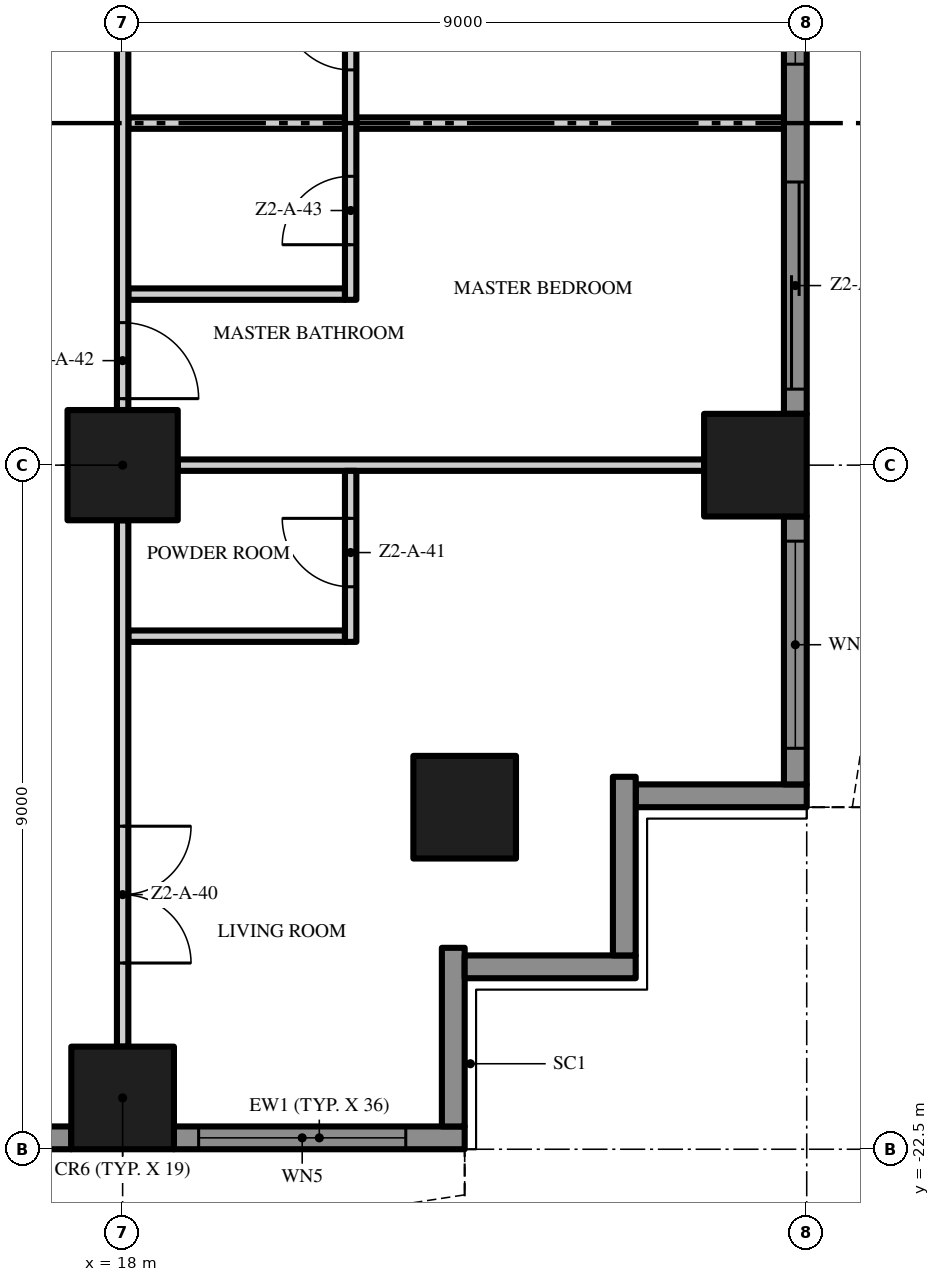
"""IFC4 building model, lengths in metres.
Left out: names, types, materials, properties, quantities, classifications, styles, units other than length and angle.
Written with IfcOpenShell. Run it as: python <this file> out.ifc"""

import sys

from ifc_helpers import new_model, si_unit, direction, frame, frame_2d, origin, origin_2d, place, context, subcontext, project, spatial, polyline, rectangle, outline, extrude, element, fill, save


model = new_model("IFC4")
c1 = context("Model", 3, precision=1e-05, world=origin(), true_north=direction((0.0, 1.0)))
c2 = subcontext(c1, "Body", "Model", "MODEL_VIEW")
j1 = project(units=[si_unit("LENGTHUNIT", "METRE"), si_unit("PLANEANGLEUNIT", "RADIAN")], contexts=[c1])
p1 = place(None, origin())
s1 = spatial("IfcSite", under=j1, at=p1, CompositionType="ELEMENT")
p2 = place(p1, origin())
s2 = spatial("IfcBuilding", under=s1, at=p2, CompositionType="ELEMENT")
p3 = place(p2, frame((0.0, 0.0, 69.4)))
s3 = spatial("IfcBuildingStorey", under=s2, at=p3, CompositionType="ELEMENT", Elevation=69.4)
p4 = place(p3, frame((18.0, -13.5, 0.0), z_axis=(0.0, 0.0, 1.0), x_axis=(1.0, 0.0, 0.0)))
e1 = element("IfcColumn", 1, at=p4, inside=s3, PredefinedType="COLUMN", context=c2, shape_type="SweptSolid", body=[
    extrude(rectangle(XDim=1.45, YDim=1.45, at=origin_2d()), origin(), (0.0, 0.0, 1.0), 3.5),
])
for number, where, z_axis, x_axis in (
    (2, (18.0, -21.825, 0.0), (0.0, 0.0, 1.0), (1.0, 0.0, 0.0)),
    (3, (26.325, -13.5, 0.0), (0.0, 0.0, 1.0), (1.0, 0.0, 0.0)),
    (4, (22.5, -18.0, 0.0), (0.0, 0.0, 1.0), (1.0, 0.0, 0.0)),
):
    element("IfcColumn", number, at=place(p3, frame(where, z_axis=z_axis, x_axis=x_axis)), inside=s3, PredefinedType="COLUMN", context=c2, shape_type="SweptSolid", body=[
        extrude(rectangle(XDim=1.35, YDim=1.35, at=origin_2d()), origin(), (0.0, 0.0, 1.0), 3.5),
    ])
p5 = place(p3, frame((17.325, -22.35, 0.0), z_axis=(0.0, 0.0, 1.0), x_axis=(-1.0, 0.0, 0.0)))
e5 = element("IfcWall", 5, at=p5, inside=s3, PredefinedType="SOLIDWALL", context=c2, shape_type="SweptSolid", body=[
    extrude(rectangle(XDim=7.65, YDim=0.3, at=frame_2d((3.825, 0.0))), origin(), (0.0, 0.0, 1.0), 3.5),
])
p6 = place(p5, frame((4.6, 0.0, 0.45)))
e6 = element("IfcOpeningElement", 6, at=p6, cuts=e5, PredefinedType="OPENING", context=c2, shape_type="SweptSolid", body=[
    extrude(rectangle(XDim=2.725, YDim=2.65, at=frame_2d((1.363, 1.325))), frame((0.0, 0.16, 0.0), z_axis=(0.0, -1.0, 0.0), x_axis=(1.0, 0.0, 0.0)), (0.0, 0.0, 1.0), 0.32),
])
p7 = place(p5, frame((0.325, 0.0, 0.0)))
e7 = element("IfcOpeningElement", 7, at=p7, cuts=e5, PredefinedType="OPENING", context=c2, shape_type="SweptSolid", body=[
    extrude(rectangle(XDim=2.725, YDim=2.4, at=frame_2d((1.363, 1.2))), frame((0.0, 0.16, 0.0), z_axis=(0.0, -1.0, 0.0), x_axis=(1.0, 0.0, 0.0)), (0.0, 0.0, 1.0), 0.32),
])
p8 = place(p3, frame((22.5, -22.35, 0.0), z_axis=(0.0, 0.0, 1.0), x_axis=(-1.0, 0.0, 0.0)))
e8 = element("IfcWall", 8, at=p8, inside=s3, PredefinedType="SOLIDWALL", context=c2, shape_type="SweptSolid", body=[
    extrude(rectangle(XDim=3.825, YDim=0.3, at=frame_2d((1.913, 0.0))), origin(), (0.0, 0.0, 1.0), 3.5),
])
p9 = place(p8, frame((0.775, 0.0, 0.45)))
e9 = element("IfcOpeningElement", 9, at=p9, cuts=e8, PredefinedType="OPENING", context=c2, shape_type="SweptSolid", body=[
    extrude(rectangle(XDim=2.725, YDim=2.65, at=frame_2d((1.363, 1.325))), frame((0.0, 0.16, 0.0), z_axis=(0.0, -1.0, 0.0), x_axis=(1.0, 0.0, 0.0)), (0.0, 0.0, 1.0), 0.32),
])
p10 = place(p3, frame((22.35, -19.85, 0.0), z_axis=(0.0, 0.0, 1.0), x_axis=(0.0, -1.0, 0.0)))
e10 = element("IfcWall", 10, at=p10, inside=s3, PredefinedType="SOLIDWALL", context=c2, shape_type="SweptSolid", body=[
    extrude(rectangle(XDim=2.35, YDim=0.3, at=frame_2d((1.175, 0.0))), origin(), (0.0, 0.0, 1.0), 3.5),
])
p11 = place(p3, frame((24.75, -20.1, 0.0), z_axis=(0.0, 0.0, 1.0), x_axis=(-1.0, 0.0, 0.0)))
e11 = element("IfcWall", 11, at=p11, inside=s3, PredefinedType="SOLIDWALL", context=c2, shape_type="SweptSolid", body=[
    extrude(rectangle(XDim=2.25, YDim=0.3, at=frame_2d((1.125, 0.0))), origin(), (0.0, 0.0, 1.0), 3.5),
])
p12 = place(p3, frame((24.6, -17.6, 0.0), z_axis=(0.0, 0.0, 1.0), x_axis=(0.0, -1.0, 0.0)))
e12 = element("IfcWall", 12, at=p12, inside=s3, PredefinedType="SOLIDWALL", context=c2, shape_type="SweptSolid", body=[
    extrude(rectangle(XDim=2.35, YDim=0.3, at=frame_2d((1.175, 0.0))), origin(), (0.0, 0.0, 1.0), 3.5),
])
p13 = place(p3, frame((27.0, -17.85, 0.0), z_axis=(0.0, 0.0, 1.0), x_axis=(-1.0, 0.0, 0.0)))
e13 = element("IfcWall", 13, at=p13, inside=s3, PredefinedType="SOLIDWALL", context=c2, shape_type="SweptSolid", body=[
    extrude(rectangle(XDim=2.25, YDim=0.3, at=frame_2d((1.125, 0.0))), origin(), (0.0, 0.0, 1.0), 3.5),
])
p14 = place(p3, frame((26.85, -14.175, 0.0), z_axis=(0.0, 0.0, 1.0), x_axis=(0.0, -1.0, 0.0)))
e14 = element("IfcWall", 14, at=p14, inside=s3, PredefinedType="SOLIDWALL", context=c2, shape_type="SweptSolid", body=[
    extrude(rectangle(XDim=3.525, YDim=0.3, at=frame_2d((1.762, 0.0))), origin(), (0.0, 0.0, 1.0), 3.5),
])
p15 = place(p14, frame((0.325, 0.0, 0.45)))
e15 = element("IfcOpeningElement", 15, at=p15, cuts=e14, PredefinedType="OPENING", context=c2, shape_type="SweptSolid", body=[
    extrude(rectangle(XDim=2.725, YDim=2.65, at=frame_2d((1.363, 1.325))), frame((0.0, 0.16, 0.0), z_axis=(0.0, -1.0, 0.0), x_axis=(1.0, 0.0, 0.0)), (0.0, 0.0, 1.0), 0.32),
])
p16 = place(p3, frame((26.85, -5.175, 0.0), z_axis=(0.0, 0.0, 1.0), x_axis=(0.0, -1.0, 0.0)))
e16 = element("IfcWall", 16, at=p16, inside=s3, PredefinedType="SOLIDWALL", context=c2, shape_type="SweptSolid", body=[
    extrude(rectangle(XDim=7.65, YDim=0.3, at=frame_2d((3.825, 0.0))), origin(), (0.0, 0.0, 1.0), 3.5),
])
p17 = place(p16, frame((4.6, 0.0, 0.0)))
e17 = element("IfcOpeningElement", 17, at=p17, cuts=e16, PredefinedType="OPENING", context=c2, shape_type="SweptSolid", body=[
    extrude(rectangle(XDim=2.725, YDim=2.4, at=frame_2d((1.363, 1.2))), frame((0.0, 0.16, 0.0), z_axis=(0.0, -1.0, 0.0), x_axis=(1.0, 0.0, 0.0)), (0.0, 0.0, 1.0), 0.32),
])
p18 = place(p16, frame((0.325, 0.0, 0.45)))
e18 = element("IfcOpeningElement", 18, at=p18, cuts=e16, PredefinedType="OPENING", context=c2, shape_type="SweptSolid", body=[
    extrude(rectangle(XDim=2.725, YDim=2.65, at=frame_2d((1.363, 1.325))), frame((0.0, 0.16, 0.0), z_axis=(0.0, -1.0, 0.0), x_axis=(1.0, 0.0, 0.0)), (0.0, 0.0, 1.0), 0.32),
])
p19 = place(p3, origin())
e19 = element("IfcWall", 19, at=p19, inside=s3, PredefinedType="USERDEFINED", context=c2, shape_type="SweptSolid", body=[
    extrude(outline(polyline([(-22.5, -23.1), (-21.0, -23.329), (-19.5, -23.929), (-18.0, -24.671), (-16.5, -25.271), (-15.0, -25.5), (-13.5, -25.271), (-12.0, -24.671), (-10.5, -23.929), (-9.0, -23.329), (-7.5, -23.1), (-6.0, -23.329), (-4.5, -23.929), (-3.0, -24.671), (-1.5, -25.271), (0.0, -25.5), (1.5, -25.271), (3.0, -24.671), (4.5, -23.929), (6.0, -23.329), (7.5, -23.1), (9.0, -23.329), (10.5, -23.929), (12.0, -24.671), (13.5, -25.271), (15.0, -25.5), (16.5, -25.271), (18.0, -24.671), (19.5, -23.929), (21.0, -23.329), (22.5, -23.1), (22.462, -22.853), (20.934, -23.086), (19.398, -23.701), (17.898, -24.442), (16.434, -25.028), (15.0, -25.247), (13.566, -25.028), (12.102, -24.442), (10.602, -23.701), (9.066, -23.086), (7.5, -22.847), (5.934, -23.086), (4.398, -23.701), (2.898, -24.442), (1.434, -25.028), (0.0, -25.247), (-1.434, -25.028), (-2.898, -24.442), (-4.398, -23.701), (-5.934, -23.086), (-7.5, -22.847), (-9.066, -23.086), (-10.602, -23.701), (-12.102, -24.442), (-13.566, -25.028), (-15.0, -25.247), (-16.434, -25.028), (-17.898, -24.442), (-19.398, -23.701), (-20.934, -23.086), (-22.462, -22.853), (-22.5, -23.1)])), origin(), (0.0, 0.0, 1.0), 0.9),
])
p20 = place(p3, origin())
e20 = element("IfcWall", 20, at=p20, inside=s3, PredefinedType="USERDEFINED", context=c2, shape_type="SweptSolid", body=[
    extrude(outline(polyline([(27.6, -18.0), (27.829, -16.5), (28.429, -15.0), (29.171, -13.5), (29.771, -12.0), (30.0, -10.5), (29.771, -9.0), (29.171, -7.5), (28.429, -6.0), (27.829, -4.5), (27.6, -3.0), (27.829, -1.5), (28.429, 0.0), (29.171, 1.5), (29.771, 3.0), (30.0, 4.5), (29.771, 6.0), (29.171, 7.5), (28.429, 9.0), (27.829, 10.5), (27.6, 12.0), (27.829, 13.5), (28.429, 15.0), (29.171, 16.5), (29.771, 18.0), (29.539, 18.093), (28.942, 16.602), (28.201, 15.102), (27.586, 13.566), (27.347, 12.0), (27.586, 10.434), (28.201, 8.898), (28.942, 7.398), (29.528, 5.934), (29.747, 4.5), (29.528, 3.066), (28.942, 1.602), (28.201, 0.102), (27.586, -1.434), (27.347, -3.0), (27.586, -4.566), (28.201, -6.102), (28.942, -7.602), (29.528, -9.066), (29.747, -10.5), (29.528, -11.934), (28.942, -13.398), (28.201, -14.898), (27.586, -16.434), (27.353, -17.962), (27.6, -18.0)])), origin(), (0.0, 0.0, 1.0), 0.9),
])
p21 = place(p3, frame((18.075, -15.75, 0.0), z_axis=(0.0, 0.0, 1.0), x_axis=(1.0, 0.0, 0.0)))
e21 = element("IfcWall", 21, at=p21, inside=s3, PredefinedType="PARTITIONING", context=c2, shape_type="SweptSolid", body=[
    extrude(rectangle(XDim=2.85, YDim=0.15, at=frame_2d((1.425, 0.0))), origin(), (0.0, 0.0, 1.0), 3.5),
])
p22 = place(p3, frame((18.725, -13.5, 0.0), z_axis=(0.0, 0.0, 1.0), x_axis=(1.0, 0.0, 0.0)))
e22 = element("IfcWall", 22, at=p22, inside=s3, PredefinedType="PARTITIONING", context=c2, shape_type="SweptSolid", body=[
    extrude(rectangle(XDim=6.925, YDim=0.15, at=frame_2d((3.462, 0.0))), origin(), (0.0, 0.0, 1.0), 3.5),
])
for number, where, z_axis, x_axis in (
    (23, (18.075, -11.25, 0.0), (0.0, 0.0, 1.0), (1.0, 0.0, 0.0)),
    (24, (18.075, -9.0, 0.0), (0.0, 0.0, 1.0), (1.0, 0.0, 0.0)),
):
    element("IfcWall", number, at=place(p3, frame(where, z_axis=z_axis, x_axis=x_axis)), inside=s3, PredefinedType="PARTITIONING", context=c2, shape_type="SweptSolid", body=[
        extrude(rectangle(XDim=2.85, YDim=0.15, at=frame_2d((1.425, 0.0))), origin(), (0.0, 0.0, 1.0), 3.5),
    ])
p23 = place(p3, frame((21.075, -9.0, 0.0), z_axis=(0.0, 0.0, 1.0), x_axis=(1.0, 0.0, 0.0)))
e25 = element("IfcWall", 25, at=p23, inside=s3, PredefinedType="PARTITIONING", context=c2, shape_type="SweptSolid", body=[
    extrude(rectangle(XDim=5.625, YDim=0.15, at=frame_2d((2.812, 0.0))), origin(), (0.0, 0.0, 1.0), 3.5),
])
p24 = place(p3, frame((18.0, -14.225, 0.0), z_axis=(0.0, 0.0, 1.0), x_axis=(0.0, -1.0, 0.0)))
e26 = element("IfcWall", 26, at=p24, inside=s3, PredefinedType="PARTITIONING", context=c2, shape_type="SweptSolid", body=[
    extrude(rectangle(XDim=6.925, YDim=0.15, at=frame_2d((3.462, 0.0))), origin(), (0.0, 0.0, 1.0), 3.5),
])
p25 = place(p24, frame((4.025, 0.0, 0.0)))
e27 = element("IfcOpeningElement", 27, at=p25, cuts=e26, PredefinedType="OPENING", context=c2, shape_type="SweptSolid", body=[
    extrude(rectangle(XDim=1.8, YDim=2.4, at=frame_2d((0.9, 1.2))), frame((0.0, 0.085, 0.0), z_axis=(0.0, -1.0, 0.0), x_axis=(1.0, 0.0, 0.0)), (0.0, 0.0, 1.0), 0.17),
])
p26 = place(p3, frame((18.0, -5.225, 0.0), z_axis=(0.0, 0.0, 1.0), x_axis=(0.0, -1.0, 0.0)))
e28 = element("IfcWall", 28, at=p26, inside=s3, PredefinedType="PARTITIONING", context=c2, shape_type="SweptSolid", body=[
    extrude(rectangle(XDim=7.55, YDim=0.15, at=frame_2d((3.775, 0.0))), origin(), (0.0, 0.0, 1.0), 3.5),
])
p27 = place(p26, frame((6.4, 0.0, 0.0)))
e29 = element("IfcOpeningElement", 29, at=p27, cuts=e28, PredefinedType="OPENING", context=c2, shape_type="SweptSolid", body=[
    extrude(rectangle(XDim=1.0, YDim=2.4, at=frame_2d((0.5, 1.2))), frame((0.0, 0.085, 0.0), z_axis=(0.0, -1.0, 0.0), x_axis=(1.0, 0.0, 0.0)), (0.0, 0.0, 1.0), 0.17),
])
p28 = place(p26, frame((0.15, 0.0, 0.0)))
e30 = element("IfcOpeningElement", 30, at=p28, cuts=e28, PredefinedType="OPENING", context=c2, shape_type="SweptSolid", body=[
    extrude(rectangle(XDim=1.0, YDim=2.4, at=frame_2d((0.5, 1.2))), frame((0.0, 0.085, 0.0), z_axis=(0.0, -1.0, 0.0), x_axis=(1.0, 0.0, 0.0)), (0.0, 0.0, 1.0), 0.17),
])
p29 = place(p3, frame((21.0, -15.825, 0.0), z_axis=(0.0, 0.0, 1.0), x_axis=(0.0, 1.0, 0.0)))
e31 = element("IfcWall", 31, at=p29, inside=s3, PredefinedType="PARTITIONING", context=c2, shape_type="SweptSolid", body=[
    extrude(rectangle(XDim=2.25, YDim=0.15, at=frame_2d((1.125, 0.0))), origin(), (0.0, 0.0, 1.0), 3.5),
])
p30 = place(p29, frame((0.725, 0.0, 0.0)))
e32 = element("IfcOpeningElement", 32, at=p30, cuts=e31, PredefinedType="OPENING", context=c2, shape_type="SweptSolid", body=[
    extrude(rectangle(XDim=0.9, YDim=2.1, at=frame_2d((0.45, 1.05))), frame((0.0, 0.085, 0.0), z_axis=(0.0, -1.0, 0.0), x_axis=(1.0, 0.0, 0.0)), (0.0, 0.0, 1.0), 0.17),
])
p31 = place(p3, frame((21.0, -11.325, 0.0), z_axis=(0.0, 0.0, 1.0), x_axis=(0.0, 1.0, 0.0)))
e33 = element("IfcWall", 33, at=p31, inside=s3, PredefinedType="PARTITIONING", context=c2, shape_type="SweptSolid", body=[
    extrude(rectangle(XDim=4.65, YDim=0.15, at=frame_2d((2.325, 0.0))), origin(), (0.0, 0.0, 1.0), 3.5),
])
p32 = place(p31, frame((0.725, 0.0, 0.0)))
e34 = element("IfcOpeningElement", 34, at=p32, cuts=e33, PredefinedType="OPENING", context=c2, shape_type="SweptSolid", body=[
    extrude(rectangle(XDim=0.9, YDim=2.1, at=frame_2d((0.45, 1.05))), frame((0.0, 0.085, 0.0), z_axis=(0.0, -1.0, 0.0), x_axis=(1.0, 0.0, 0.0)), (0.0, 0.0, 1.0), 0.17),
])
p33 = place(p31, frame((3.025, 0.0, 0.0)))
e35 = element("IfcOpeningElement", 35, at=p33, cuts=e33, PredefinedType="OPENING", context=c2, shape_type="SweptSolid", body=[
    extrude(rectangle(XDim=0.9, YDim=2.1, at=frame_2d((0.45, 1.05))), frame((0.0, 0.085, 0.0), z_axis=(0.0, -1.0, 0.0), x_axis=(1.0, 0.0, 0.0)), (0.0, 0.0, 1.0), 0.17),
])
p34 = place(p9, origin())
e36 = element("IfcWindow", 36, at=p34, inside=s3, PartitioningType="SINGLE_PANEL", PredefinedType="WINDOW", context=c2, shape_type="SweptSolid", body=[
    extrude(rectangle(XDim=2.725, YDim=2.65, at=frame_2d((1.363, 1.325))), frame((0.0, 0.03, 0.0), z_axis=(0.0, -1.0, 0.0), x_axis=(1.0, 0.0, 0.0)), (0.0, 0.0, 1.0), 0.06),
])
fill(e9, e36)
p35 = place(p15, origin())
e37 = element("IfcWindow", 37, at=p35, inside=s3, PartitioningType="SINGLE_PANEL", PredefinedType="WINDOW", context=c2, shape_type="SweptSolid", body=[
    extrude(rectangle(XDim=2.725, YDim=2.65, at=frame_2d((1.363, 1.325))), frame((0.0, 0.03, 0.0), z_axis=(0.0, -1.0, 0.0), x_axis=(1.0, 0.0, 0.0)), (0.0, 0.0, 1.0), 0.06),
])
fill(e15, e37)
p36 = place(p17, origin())
e38 = element("IfcDoor", 38, at=p36, inside=s3, OperationType="SINGLE_SWING_LEFT", PredefinedType="DOOR", context=c2, shape_type="SweptSolid", body=[
    extrude(rectangle(XDim=2.725, YDim=2.4, at=frame_2d((1.363, 1.2))), frame((0.0, 0.025, 0.0), z_axis=(0.0, -1.0, 0.0), x_axis=(1.0, 0.0, 0.0)), (0.0, 0.0, 1.0), 0.05),
])
fill(e17, e38)
p37 = place(p18, origin())
e39 = element("IfcWindow", 39, at=p37, inside=s3, PartitioningType="SINGLE_PANEL", PredefinedType="WINDOW", context=c2, shape_type="SweptSolid", body=[
    extrude(rectangle(XDim=2.725, YDim=2.65, at=frame_2d((1.363, 1.325))), frame((0.0, 0.03, 0.0), z_axis=(0.0, -1.0, 0.0), x_axis=(1.0, 0.0, 0.0)), (0.0, 0.0, 1.0), 0.06),
])
fill(e18, e39)
p38 = place(p25, origin())
e40 = element("IfcDoor", 40, at=p38, inside=s3, OperationType="DOUBLE_DOOR_SINGLE_SWING", PredefinedType="DOOR", context=c2, shape_type="SweptSolid", body=[
    extrude(rectangle(XDim=1.8, YDim=2.4, at=frame_2d((0.9, 1.2))), frame((0.0, 0.025, 0.0), z_axis=(0.0, -1.0, 0.0), x_axis=(1.0, 0.0, 0.0)), (0.0, 0.0, 1.0), 0.05),
])
fill(e27, e40)
p39 = place(p30, origin())
e41 = element("IfcDoor", 41, at=p39, inside=s3, OperationType="SINGLE_SWING_RIGHT", PredefinedType="DOOR", context=c2, shape_type="SweptSolid", body=[
    extrude(rectangle(XDim=0.9, YDim=2.1, at=frame_2d((0.45, 1.05))), frame((0.0, 0.025, 0.0), z_axis=(0.0, -1.0, 0.0), x_axis=(1.0, 0.0, 0.0)), (0.0, 0.0, 1.0), 0.05),
])
fill(e32, e41)
p40 = place(p27, origin())
e42 = element("IfcDoor", 42, at=p40, inside=s3, OperationType="SINGLE_SWING_RIGHT", PredefinedType="DOOR", context=c2, shape_type="SweptSolid", body=[
    extrude(rectangle(XDim=1.0, YDim=2.4, at=frame_2d((0.5, 1.2))), frame((0.0, 0.025, 0.0), z_axis=(0.0, -1.0, 0.0), x_axis=(1.0, 0.0, 0.0)), (0.0, 0.0, 1.0), 0.05),
])
fill(e29, e42)
p41 = place(p32, origin())
e43 = element("IfcDoor", 43, at=p41, inside=s3, OperationType="SINGLE_SWING_LEFT", PredefinedType="DOOR", context=c2, shape_type="SweptSolid", body=[
    extrude(rectangle(XDim=0.9, YDim=2.1, at=frame_2d((0.45, 1.05))), frame((0.0, 0.025, 0.0), z_axis=(0.0, -1.0, 0.0), x_axis=(1.0, 0.0, 0.0)), (0.0, 0.0, 1.0), 0.05),
])
fill(e34, e43)
p42 = place(p33, origin())
e44 = element("IfcDoor", 44, at=p42, inside=s3, OperationType="SINGLE_SWING_RIGHT", PredefinedType="DOOR", context=c2, shape_type="SweptSolid", body=[
    extrude(rectangle(XDim=0.9, YDim=2.1, at=frame_2d((0.45, 1.05))), frame((0.0, 0.025, 0.0), z_axis=(0.0, -1.0, 0.0), x_axis=(1.0, 0.0, 0.0)), (0.0, 0.0, 1.0), 0.05),
])
fill(e35, e44)
save(model, sys.argv[1])
